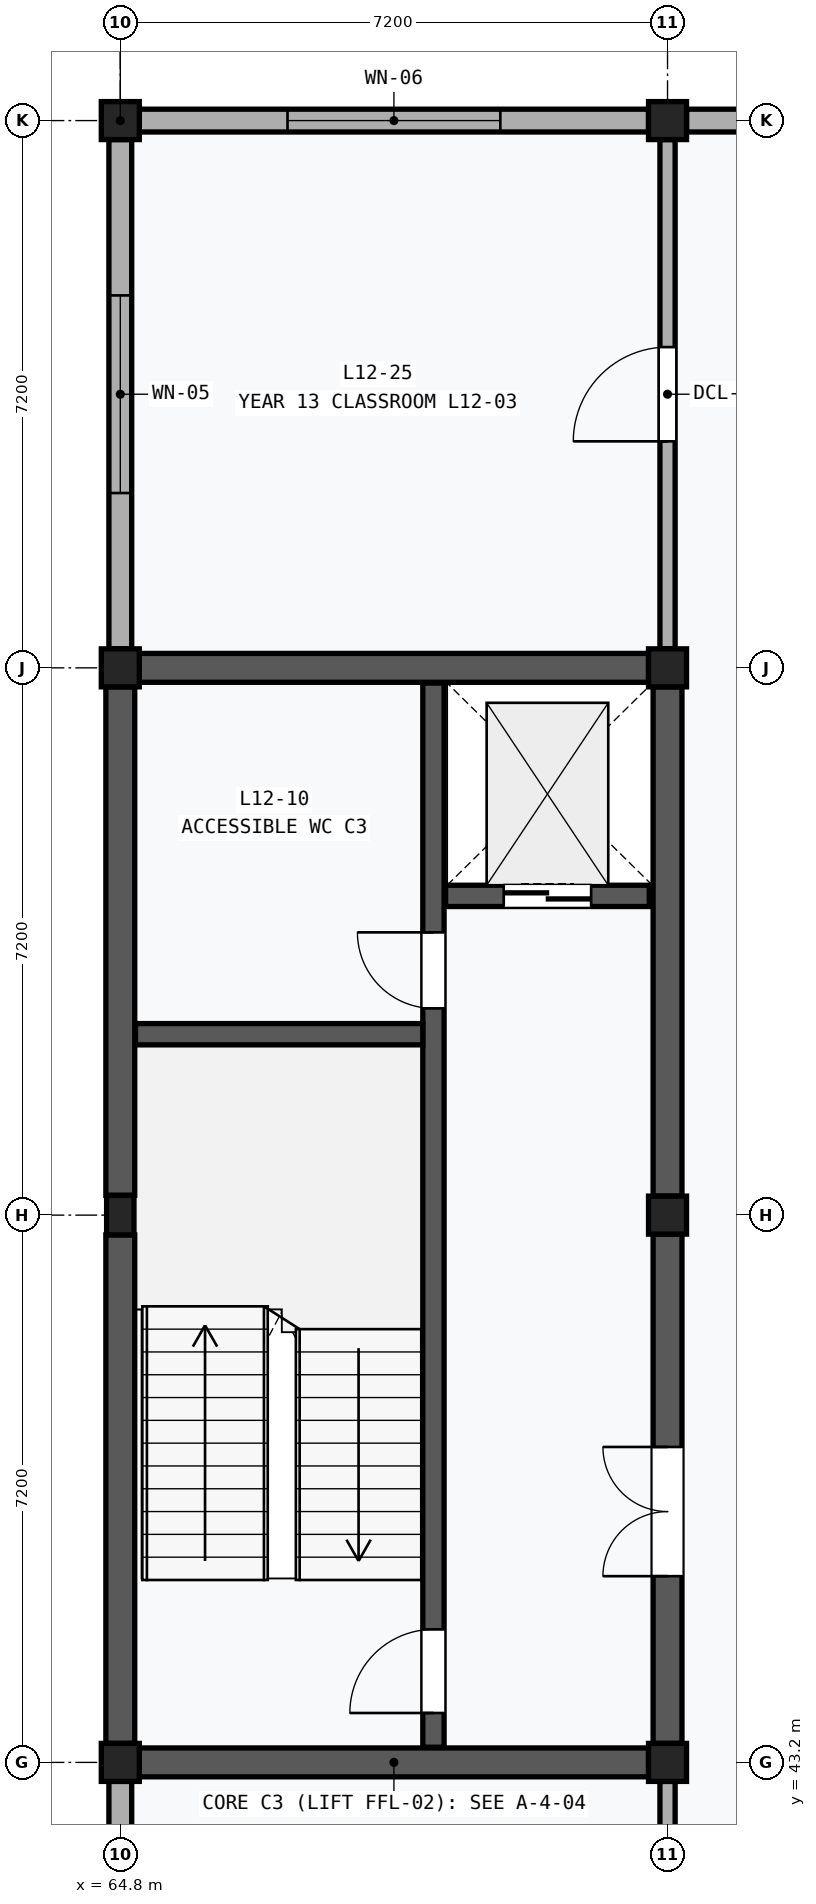
"""IFC4 building model, lengths in metres.
Left out: names, types, materials, properties, quantities, classifications, styles, units other than length and angle.
Written with IfcOpenShell. Run it as: python <this file> out.ifc"""

import sys

from ifc_helpers import new_model, si_unit, direction, frame, frame_2d, origin, origin_2d, place, context, subcontext, project, spatial, rectangle, extrude, element, fill, save


model = new_model("IFC4")
c1 = context("Model", 3, precision=1e-05, world=origin(), true_north=direction((0.0, 1.0)))
c2 = subcontext(c1, "Body", "Model", "MODEL_VIEW")
j1 = project(units=[si_unit("LENGTHUNIT", "METRE"), si_unit("PLANEANGLEUNIT", "RADIAN")], contexts=[c1])
p1 = place(None, origin())
s1 = spatial("IfcSite", under=j1, at=p1, CompositionType="ELEMENT")
p2 = place(p1, origin())
s2 = spatial("IfcBuilding", under=s1, at=p2, CompositionType="ELEMENT")
p3 = place(p2, frame((0.0, 0.0, 51.0)))
s3 = spatial("IfcBuildingStorey", under=s2, at=p3, CompositionType="ELEMENT", Elevation=51.0)
p4 = place(p3, frame((64.8, 43.2, 0.0), z_axis=(0.0, 0.0, 1.0), x_axis=(1.0, 0.0, 0.0)))
e1 = element("IfcColumn", 1, at=p4, inside=s3, PredefinedType="COLUMN", context=c2, shape_type="SweptSolid", body=[
    extrude(rectangle(XDim=0.5, YDim=0.5, at=origin_2d()), origin(), (0.0, 0.0, 1.0), 4.0),
])
p5 = place(p3, frame((64.8, 50.4, 0.0), z_axis=(0.0, 0.0, 1.0), x_axis=(1.0, 0.0, 0.0)))
e2 = element("IfcColumn", 2, at=p5, inside=s3, PredefinedType="PILASTER", context=c2, shape_type="SweptSolid", body=[
    extrude(rectangle(XDim=0.36, YDim=0.52, at=origin_2d()), origin(), (0.0, 0.0, 1.0), 4.0),
])
for number, where, z_axis, x_axis in (
    (3, (64.8, 57.6, 0.0), (0.0, 0.0, 1.0), (1.0, 0.0, 0.0)),
    (4, (64.8, 64.8, 0.0), (0.0, 0.0, 1.0), (1.0, 0.0, 0.0)),
    (5, (72.0, 43.2, 0.0), (0.0, 0.0, 1.0), (1.0, 0.0, 0.0)),
    (6, (72.0, 50.4, 0.0), (0.0, 0.0, 1.0), (1.0, 0.0, 0.0)),
    (7, (72.0, 57.6, 0.0), (0.0, 0.0, 1.0), (1.0, 0.0, 0.0)),
    (8, (72.0, 64.8, 0.0), (0.0, 0.0, 1.0), (1.0, 0.0, 0.0)),
):
    element("IfcColumn", number, at=place(p3, frame(where, z_axis=z_axis, x_axis=x_axis)), inside=s3, PredefinedType="COLUMN", context=c2, shape_type="SweptSolid", body=[
        extrude(rectangle(XDim=0.5, YDim=0.5, at=origin_2d()), origin(), (0.0, 0.0, 1.0), 4.0),
    ])
p6 = place(p3, frame((64.8, 36.25, 0.0), z_axis=(0.0, 0.0, 1.0), x_axis=(0.0, 1.0, 0.0)))
e9 = element("IfcWall", 9, at=p6, inside=s3, PredefinedType="SOLIDWALL", context=c2, shape_type="SweptSolid", body=[
    extrude(rectangle(XDim=6.7, YDim=0.3, at=frame_2d((3.35, 0.0))), origin(), (0.0, 0.0, 1.0), 3.17),
])
p7 = place(p3, frame((65.05, 64.8, 0.0), z_axis=(0.0, 0.0, 1.0), x_axis=(1.0, 0.0, 0.0)))
e10 = element("IfcWall", 10, at=p7, inside=s3, PredefinedType="SOLIDWALL", context=c2, shape_type="SweptSolid", body=[
    extrude(rectangle(XDim=6.7, YDim=0.3, at=frame_2d((3.35, 0.0))), origin(), (0.0, 0.0, 1.0), 3.17),
])
p8 = place(p7, frame((1.95, 0.0, 0.9)))
e11 = element("IfcOpeningElement", 11, at=p8, cuts=e10, PredefinedType="OPENING", context=c2, shape_type="SweptSolid", body=[
    extrude(rectangle(XDim=2.8, YDim=1.8, at=frame_2d((1.4, 0.9))), frame((0.0, 0.162, 0.0), z_axis=(0.0, -1.0, 0.0), x_axis=(1.0, 0.0, 0.0)), (0.0, 0.0, 1.0), 0.324),
])
p9 = place(p3, frame((64.8, 57.85, 0.0), z_axis=(0.0, 0.0, 1.0), x_axis=(0.0, 1.0, 0.0)))
e12 = element("IfcWall", 12, at=p9, inside=s3, PredefinedType="SOLIDWALL", context=c2, shape_type="SweptSolid", body=[
    extrude(rectangle(XDim=6.7, YDim=0.3, at=frame_2d((3.35, 0.0))), origin(), (0.0, 0.0, 1.0), 3.17),
])
p10 = place(p9, frame((2.05, 0.0, 0.9)))
e13 = element("IfcOpeningElement", 13, at=p10, cuts=e12, PredefinedType="OPENING", context=c2, shape_type="SweptSolid", body=[
    extrude(rectangle(XDim=2.6, YDim=1.8, at=frame_2d((1.3, 0.9))), frame((0.0, 0.162, 0.0), z_axis=(0.0, -1.0, 0.0), x_axis=(1.0, 0.0, 0.0)), (0.0, 0.0, 1.0), 0.324),
])
p11 = place(p3, frame((72.25, 64.8, 0.0), z_axis=(0.0, 0.0, 1.0), x_axis=(1.0, 0.0, 0.0)))
e14 = element("IfcWall", 14, at=p11, inside=s3, PredefinedType="SOLIDWALL", context=c2, shape_type="SweptSolid", body=[
    extrude(rectangle(XDim=6.77, YDim=0.3, at=frame_2d((3.385, 0.0))), origin(), (0.0, 0.0, 1.0), 3.17),
])
p12 = place(p11, frame((1.885, 0.0, 0.9)))
e15 = element("IfcOpeningElement", 15, at=p12, cuts=e14, PredefinedType="OPENING", context=c2, shape_type="SweptSolid", body=[
    extrude(rectangle(XDim=3.0, YDim=1.8, at=frame_2d((1.5, 0.9))), frame((0.0, 0.162, 0.0), z_axis=(0.0, -1.0, 0.0), x_axis=(1.0, 0.0, 0.0)), (0.0, 0.0, 1.0), 0.324),
])
p13 = place(p3, frame((64.8, 43.45, 0.0), z_axis=(0.0, 0.0, 1.0), x_axis=(0.0, 1.0, 0.0)))
e16 = element("IfcWall", 16, at=p13, inside=s3, PredefinedType="SHEAR", context=c2, shape_type="SweptSolid", body=[
    extrude(rectangle(XDim=6.69, YDim=0.38, at=frame_2d((3.345, 0.0))), origin(), (0.0, 0.0, 1.0), 3.17),
])
p14 = place(p3, frame((64.8, 50.66, 0.0), z_axis=(0.0, 0.0, 1.0), x_axis=(0.0, 1.0, 0.0)))
e17 = element("IfcWall", 17, at=p14, inside=s3, PredefinedType="SHEAR", context=c2, shape_type="SweptSolid", body=[
    extrude(rectangle(XDim=6.69, YDim=0.38, at=frame_2d((3.345, 0.0))), origin(), (0.0, 0.0, 1.0), 3.17),
])
p15 = place(p3, frame((72.0, 43.45, 0.0), z_axis=(0.0, 0.0, 1.0), x_axis=(0.0, 1.0, 0.0)))
e18 = element("IfcWall", 18, at=p15, inside=s3, PredefinedType="SHEAR", context=c2, shape_type="SweptSolid", body=[
    extrude(rectangle(XDim=6.7, YDim=0.38, at=frame_2d((3.35, 0.0))), origin(), (0.0, 0.0, 1.0), 3.09),
])
p16 = place(p15, frame((2.2, 0.0, 0.0)))
e19 = element("IfcOpeningElement", 19, at=p16, cuts=e18, PredefinedType="OPENING", context=c2, shape_type="SweptSolid", body=[
    extrude(rectangle(XDim=1.7, YDim=2.25, at=frame_2d((0.85, 1.125))), frame((0.0, 0.202, 0.0), z_axis=(0.0, -1.0, 0.0), x_axis=(1.0, 0.0, 0.0)), (0.0, 0.0, 1.0), 0.404),
])
p17 = place(p3, frame((72.0, 50.65, 0.0), z_axis=(0.0, 0.0, 1.0), x_axis=(0.0, 1.0, 0.0)))
e20 = element("IfcWall", 20, at=p17, inside=s3, PredefinedType="SHEAR", context=c2, shape_type="SweptSolid", body=[
    extrude(rectangle(XDim=6.7, YDim=0.38, at=frame_2d((3.35, 0.0))), origin(), (0.0, 0.0, 1.0), 3.09),
])
for number, where, z_axis, x_axis in (
    (21, (65.05, 43.2, 0.0), (0.0, 0.0, 1.0), (1.0, 0.0, 0.0)),
    (22, (65.05, 57.6, 0.0), (0.0, 0.0, 1.0), (1.0, 0.0, 0.0)),
):
    element("IfcWall", number, at=place(p3, frame(where, z_axis=z_axis, x_axis=x_axis)), inside=s3, PredefinedType="SHEAR", context=c2, shape_type="SweptSolid", body=[
        extrude(rectangle(XDim=6.7, YDim=0.38, at=frame_2d((3.35, 0.0))), origin(), (0.0, 0.0, 1.0), 3.09),
    ])
p18 = place(p3, frame((68.92, 43.4, 0.0), z_axis=(0.0, 0.0, 1.0), x_axis=(0.0, 1.0, 0.0)))
e23 = element("IfcWall", 23, at=p18, inside=s3, PredefinedType="SHEAR", context=c2, shape_type="SweptSolid", body=[
    extrude(rectangle(XDim=14.0, YDim=0.28, at=frame_2d((7.0, 0.0))), origin(), (0.0, 0.0, 1.0), 3.78),
])
p19 = place(p18, frame((0.45, 0.0, 0.0)))
e24 = element("IfcOpeningElement", 24, at=p19, cuts=e23, PredefinedType="OPENING", context=c2, shape_type="SweptSolid", body=[
    extrude(rectangle(XDim=1.1, YDim=2.15, at=frame_2d((0.55, 1.075))), frame((0.0, 0.152, 0.0), z_axis=(0.0, -1.0, 0.0), x_axis=(1.0, 0.0, 0.0)), (0.0, 0.0, 1.0), 0.304),
])
p20 = place(p18, frame((9.72, 0.0, 0.0)))
e25 = element("IfcOpeningElement", 25, at=p20, cuts=e23, PredefinedType="OPENING", context=c2, shape_type="SweptSolid", body=[
    extrude(rectangle(XDim=1.0, YDim=2.15, at=frame_2d((0.5, 1.075))), frame((0.0, 0.152, 0.0), z_axis=(0.0, -1.0, 0.0), x_axis=(1.0, 0.0, 0.0)), (0.0, 0.0, 1.0), 0.304),
])
p21 = place(p3, frame((65.0, 52.78, 0.0), z_axis=(0.0, 0.0, 1.0), x_axis=(1.0, 0.0, 0.0)))
e26 = element("IfcWall", 26, at=p21, inside=s3, PredefinedType="SHEAR", context=c2, shape_type="SweptSolid", body=[
    extrude(rectangle(XDim=3.78, YDim=0.28, at=frame_2d((1.89, 0.0))), origin(), (0.0, 0.0, 1.0), 3.78),
])
p22 = place(p3, frame((69.08, 54.6, 0.0), z_axis=(0.0, 0.0, 1.0), x_axis=(1.0, 0.0, 0.0)))
e27 = element("IfcWall", 27, at=p22, inside=s3, PredefinedType="SHEAR", context=c2, shape_type="SweptSolid", body=[
    extrude(rectangle(XDim=2.68, YDim=0.28, at=frame_2d((1.34, 0.0))), origin(), (0.0, 0.0, 1.0), 3.78),
])
p23 = place(p22, frame((0.765, 0.0, 0.0)))
e28 = element("IfcOpeningElement", 28, at=p23, cuts=e27, PredefinedType="OPENING", context=c2, shape_type="SweptSolid", body=[
    extrude(rectangle(XDim=1.15, YDim=2.2, at=frame_2d((0.575, 1.1))), frame((0.0, 0.152, 0.0), z_axis=(0.0, -1.0, 0.0), x_axis=(1.0, 0.0, 0.0)), (0.0, 0.0, 1.0), 0.304),
])
p24 = place(p3, frame((72.0, 36.25, 0.0), z_axis=(0.0, 0.0, 1.0), x_axis=(0.0, 1.0, 0.0)))
e29 = element("IfcWall", 29, at=p24, inside=s3, PredefinedType="PARTITIONING", context=c2, shape_type="SweptSolid", body=[
    extrude(rectangle(XDim=6.7, YDim=0.2, at=frame_2d((3.35, 0.0))), origin(), (0.0, 0.0, 1.0), 3.09),
])
p25 = place(p3, frame((72.0, 57.85, 0.0), z_axis=(0.0, 0.0, 1.0), x_axis=(0.0, 1.0, 0.0)))
e30 = element("IfcWall", 30, at=p25, inside=s3, PredefinedType="PARTITIONING", context=c2, shape_type="SweptSolid", body=[
    extrude(rectangle(XDim=6.7, YDim=0.2, at=frame_2d((3.35, 0.0))), origin(), (0.0, 0.0, 1.0), 3.09),
])
p26 = place(p25, frame((2.73, 0.0, 0.0)))
e31 = element("IfcOpeningElement", 31, at=p26, cuts=e30, PredefinedType="OPENING", context=c2, shape_type="SweptSolid", body=[
    extrude(rectangle(XDim=1.24, YDim=2.26, at=frame_2d((0.62, 1.13))), frame((0.0, 0.112, 0.0), z_axis=(0.0, -1.0, 0.0), x_axis=(1.0, 0.0, 0.0)), (0.0, 0.0, 1.0), 0.224),
])
p27 = place(p8, origin())
e32 = element("IfcWindow", 32, at=p27, inside=s3, PartitioningType="SINGLE_PANEL", PredefinedType="WINDOW", context=c2, shape_type="SweptSolid", body=[
    extrude(rectangle(XDim=2.8, YDim=1.8, at=frame_2d((1.4, 0.9))), frame((0.0, 0.03, 0.0), z_axis=(0.0, -1.0, 0.0), x_axis=(1.0, 0.0, 0.0)), (0.0, 0.0, 1.0), 0.06),
])
fill(e11, e32)
p28 = place(p10, origin())
e33 = element("IfcWindow", 33, at=p28, inside=s3, PartitioningType="SINGLE_PANEL", PredefinedType="WINDOW", context=c2, shape_type="SweptSolid", body=[
    extrude(rectangle(XDim=2.6, YDim=1.8, at=frame_2d((1.3, 0.9))), frame((0.0, 0.03, 0.0), z_axis=(0.0, -1.0, 0.0), x_axis=(1.0, 0.0, 0.0)), (0.0, 0.0, 1.0), 0.06),
])
fill(e13, e33)
p29 = place(p16, origin())
e34 = element("IfcDoor", 34, at=p29, inside=s3, OperationType="DOUBLE_DOOR_SINGLE_SWING", PredefinedType="DOOR", context=c2, shape_type="SweptSolid", body=[
    extrude(rectangle(XDim=1.7, YDim=2.25, at=frame_2d((0.85, 1.125))), frame((0.0, 0.025, 0.0), z_axis=(0.0, -1.0, 0.0), x_axis=(1.0, 0.0, 0.0)), (0.0, 0.0, 1.0), 0.05),
])
fill(e19, e34)
p30 = place(p19, origin())
e35 = element("IfcDoor", 35, at=p30, inside=s3, OperationType="SINGLE_SWING_LEFT", PredefinedType="DOOR", context=c2, shape_type="SweptSolid", body=[
    extrude(rectangle(XDim=1.1, YDim=2.15, at=frame_2d((0.55, 1.075))), frame((0.0, 0.025, 0.0), z_axis=(0.0, -1.0, 0.0), x_axis=(1.0, 0.0, 0.0)), (0.0, 0.0, 1.0), 0.05),
])
fill(e24, e35)
p31 = place(p20, origin())
e36 = element("IfcDoor", 36, at=p31, inside=s3, OperationType="SINGLE_SWING_RIGHT", PredefinedType="DOOR", context=c2, shape_type="SweptSolid", body=[
    extrude(rectangle(XDim=1.0, YDim=2.15, at=frame_2d((0.5, 1.075))), frame((0.0, 0.025, 0.0), z_axis=(0.0, -1.0, 0.0), x_axis=(1.0, 0.0, 0.0)), (0.0, 0.0, 1.0), 0.05),
])
fill(e25, e36)
p32 = place(p23, frame((1.15, 0.0, 0.0), z_axis=(0.0, 0.0, 1.0), x_axis=(-1.0, 0.0, 0.0)))
e37 = element("IfcDoor", 37, at=p32, inside=s3, OperationType="DOUBLE_DOOR_SLIDING", PredefinedType="DOOR", context=c2, shape_type="SweptSolid", body=[
    extrude(rectangle(XDim=1.15, YDim=2.2, at=frame_2d((0.575, 1.1))), frame((0.0, 0.025, 0.0), z_axis=(0.0, -1.0, 0.0), x_axis=(1.0, 0.0, 0.0)), (0.0, 0.0, 1.0), 0.05),
])
fill(e28, e37)
p33 = place(p26, origin())
e38 = element("IfcDoor", 38, at=p33, inside=s3, OperationType="SINGLE_SWING_LEFT", PredefinedType="DOOR", context=c2, shape_type="SweptSolid", body=[
    extrude(rectangle(XDim=1.24, YDim=2.26, at=frame_2d((0.62, 1.13))), frame((0.0, 0.025, 0.0), z_axis=(0.0, -1.0, 0.0), x_axis=(1.0, 0.0, 0.0)), (0.0, 0.0, 1.0), 0.05),
])
fill(e31, e38)
save(model, sys.argv[1])
